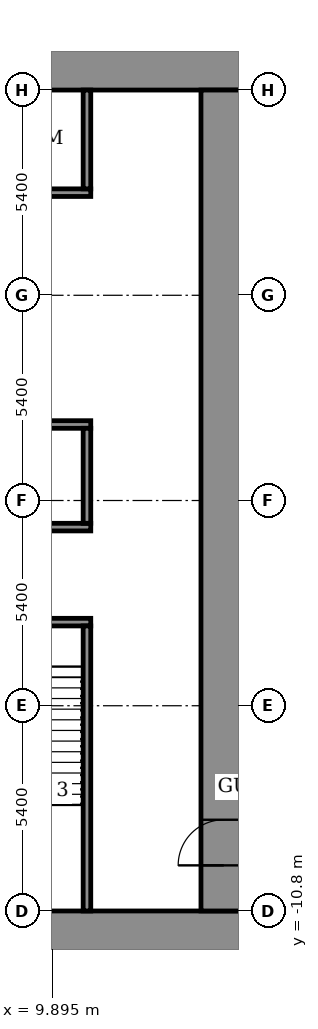
"""IFC4 building model, lengths in metres.
Left out: names, types, materials, properties, quantities, classifications, styles, units other than length and angle.
Written with IfcOpenShell. Run it as: python <this file> out.ifc"""

import sys

from ifc_helpers import new_model, si_unit, direction, frame, frame_2d, origin, place, context, subcontext, project, spatial, rectangle, extrude, element, fill, save


model = new_model("IFC4")
c1 = context("Model", 3, precision=1e-05, world=origin(), true_north=direction((0.0, 1.0)))
c2 = subcontext(c1, "Body", "Model", "MODEL_VIEW")
j1 = project(units=[si_unit("LENGTHUNIT", "METRE"), si_unit("PLANEANGLEUNIT", "RADIAN")], contexts=[c1])
p1 = place(None, origin())
s1 = spatial("IfcSite", under=j1, at=p1, CompositionType="ELEMENT")
p2 = place(p1, origin())
s2 = spatial("IfcBuilding", under=s1, at=p2, CompositionType="ELEMENT")
p3 = place(p2, frame((0.0, 0.0, 25.0)))
s3 = spatial("IfcBuildingStorey", under=s2, at=p3, CompositionType="ELEMENT", Elevation=25.0)
for number, where, z_axis, x_axis in (
    (1, (-15.0, -11.4, 0.0), (0.0, 0.0, 1.0), (1.0, 0.0, 0.0)),
    (2, (-15.0, 11.4, 0.0), (0.0, 0.0, 1.0), (1.0, 0.0, 0.0)),
):
    element("IfcWall", number, at=place(p3, frame(where, z_axis=z_axis, x_axis=x_axis)), inside=s3, PredefinedType="SHEAR", context=c2, shape_type="SweptSolid", body=[
        extrude(rectangle(XDim=30.0, YDim=1.2, at=frame_2d((15.0, 0.0))), origin(), (0.0, 0.0, 1.0), 4.5),
    ])
p4 = place(p3, frame((14.4, -10.8, 0.0), z_axis=(0.0, 0.0, 1.0), x_axis=(0.0, 1.0, 0.0)))
e3 = element("IfcWall", 3, at=p4, inside=s3, PredefinedType="SHEAR", context=c2, shape_type="SweptSolid", body=[
    extrude(rectangle(XDim=21.6, YDim=1.2, at=frame_2d((10.8, 0.0))), origin(), (0.0, 0.0, 1.0), 4.5),
])
p5 = place(p4, frame((1.2, 0.0, 0.0)))
e4 = element("IfcOpeningElement", 4, at=p5, cuts=e3, PredefinedType="OPENING", context=c2, shape_type="SweptSolid", body=[
    extrude(rectangle(XDim=1.2, YDim=2.1, at=frame_2d((0.6, 1.05))), frame((0.0, 0.61, 0.0), z_axis=(0.0, -1.0, 0.0), x_axis=(1.0, 0.0, 0.0)), (0.0, 0.0, 1.0), 1.22),
])
p6 = place(p3, frame((-10.9, -3.2, 0.0), z_axis=(0.0, 0.0, 1.0), x_axis=(1.0, 0.0, 0.0)))
e5 = element("IfcWall", 5, at=p6, inside=s3, PredefinedType="SHEAR", context=c2, shape_type="SweptSolid", body=[
    extrude(rectangle(XDim=21.8, YDim=0.2, at=frame_2d((10.9, 0.0))), origin(), (0.0, 0.0, 1.0), 3.95),
])
p7 = place(p6, frame((1.075, 0.0, 0.0)))
e6 = element("IfcOpeningElement", 6, at=p7, cuts=e5, PredefinedType="OPENING", context=c2, shape_type="SweptSolid", body=[
    extrude(rectangle(XDim=1.1, YDim=2.1, at=frame_2d((0.55, 1.05))), frame((0.0, 0.11, 0.0), z_axis=(0.0, -1.0, 0.0), x_axis=(1.0, 0.0, 0.0)), (0.0, 0.0, 1.0), 0.22),
])
p8 = place(p6, frame((10.325, 0.0, 0.0)))
e7 = element("IfcOpeningElement", 7, at=p8, cuts=e5, PredefinedType="OPENING", context=c2, shape_type="SweptSolid", body=[
    extrude(rectangle(XDim=1.1, YDim=2.1, at=frame_2d((0.55, 1.05))), frame((0.0, 0.11, 0.0), z_axis=(0.0, -1.0, 0.0), x_axis=(1.0, 0.0, 0.0)), (0.0, 0.0, 1.0), 0.22),
])
p9 = place(p6, frame((19.625, 0.0, 0.0)))
e8 = element("IfcOpeningElement", 8, at=p9, cuts=e5, PredefinedType="OPENING", context=c2, shape_type="SweptSolid", body=[
    extrude(rectangle(XDim=1.1, YDim=2.1, at=frame_2d((0.55, 1.05))), frame((0.0, 0.11, 0.0), z_axis=(0.0, -1.0, 0.0), x_axis=(1.0, 0.0, 0.0)), (0.0, 0.0, 1.0), 0.22),
])
p10 = place(p6, frame((5.7, 0.0, 0.0)))
e9 = element("IfcOpeningElement", 9, at=p10, cuts=e5, PredefinedType="OPENING", context=c2, shape_type="SweptSolid", body=[
    extrude(rectangle(XDim=1.1, YDim=2.1, at=frame_2d((0.55, 1.05))), frame((0.0, 0.11, 0.0), z_axis=(0.0, -1.0, 0.0), x_axis=(1.0, 0.0, 0.0)), (0.0, 0.0, 1.0), 0.22),
])
p11 = place(p6, frame((14.975, 0.0, 0.0)))
e10 = element("IfcOpeningElement", 10, at=p11, cuts=e5, PredefinedType="OPENING", context=c2, shape_type="SweptSolid", body=[
    extrude(rectangle(XDim=1.1, YDim=2.1, at=frame_2d((0.55, 1.05))), frame((0.0, 0.11, 0.0), z_axis=(0.0, -1.0, 0.0), x_axis=(1.0, 0.0, 0.0)), (0.0, 0.0, 1.0), 0.22),
])
p12 = place(p3, frame((-10.9, -0.7, 0.0), z_axis=(0.0, 0.0, 1.0), x_axis=(1.0, 0.0, 0.0)))
e11 = element("IfcWall", 11, at=p12, inside=s3, PredefinedType="SHEAR", context=c2, shape_type="SweptSolid", body=[
    extrude(rectangle(XDim=21.8, YDim=0.2, at=frame_2d((10.9, 0.0))), origin(), (0.0, 0.0, 1.0), 3.95),
])
p13 = place(p3, frame((-10.9, 2.0, 0.0), z_axis=(0.0, 0.0, 1.0), x_axis=(1.0, 0.0, 0.0)))
e12 = element("IfcWall", 12, at=p13, inside=s3, PredefinedType="SHEAR", context=c2, shape_type="SweptSolid", body=[
    extrude(rectangle(XDim=21.8, YDim=0.2, at=frame_2d((10.9, 0.0))), origin(), (0.0, 0.0, 1.0), 3.95),
])
p14 = place(p13, frame((0.9, 0.0, 0.0)))
e13 = element("IfcOpeningElement", 13, at=p14, cuts=e12, PredefinedType="OPENING", context=c2, shape_type="SweptSolid", body=[
    extrude(rectangle(XDim=1.1, YDim=2.1, at=frame_2d((0.55, 1.05))), frame((0.0, 0.11, 0.0), z_axis=(0.0, -1.0, 0.0), x_axis=(1.0, 0.0, 0.0)), (0.0, 0.0, 1.0), 0.22),
])
p15 = place(p13, frame((3.6, 0.0, 0.0)))
e14 = element("IfcOpeningElement", 14, at=p15, cuts=e12, PredefinedType="OPENING", context=c2, shape_type="SweptSolid", body=[
    extrude(rectangle(XDim=1.1, YDim=2.1, at=frame_2d((0.55, 1.05))), frame((0.0, 0.11, 0.0), z_axis=(0.0, -1.0, 0.0), x_axis=(1.0, 0.0, 0.0)), (0.0, 0.0, 1.0), 0.22),
])
p16 = place(p13, frame((6.3, 0.0, 0.0)))
e15 = element("IfcOpeningElement", 15, at=p16, cuts=e12, PredefinedType="OPENING", context=c2, shape_type="SweptSolid", body=[
    extrude(rectangle(XDim=1.1, YDim=2.1, at=frame_2d((0.55, 1.05))), frame((0.0, 0.11, 0.0), z_axis=(0.0, -1.0, 0.0), x_axis=(1.0, 0.0, 0.0)), (0.0, 0.0, 1.0), 0.22),
])
p17 = place(p13, frame((9.0, 0.0, 0.0)))
e16 = element("IfcOpeningElement", 16, at=p17, cuts=e12, PredefinedType="OPENING", context=c2, shape_type="SweptSolid", body=[
    extrude(rectangle(XDim=1.1, YDim=2.1, at=frame_2d((0.55, 1.05))), frame((0.0, 0.11, 0.0), z_axis=(0.0, -1.0, 0.0), x_axis=(1.0, 0.0, 0.0)), (0.0, 0.0, 1.0), 0.22),
])
p18 = place(p13, frame((11.7, 0.0, 0.0)))
e17 = element("IfcOpeningElement", 17, at=p18, cuts=e12, PredefinedType="OPENING", context=c2, shape_type="SweptSolid", body=[
    extrude(rectangle(XDim=1.1, YDim=2.1, at=frame_2d((0.55, 1.05))), frame((0.0, 0.11, 0.0), z_axis=(0.0, -1.0, 0.0), x_axis=(1.0, 0.0, 0.0)), (0.0, 0.0, 1.0), 0.22),
])
p19 = place(p13, frame((14.5, 0.0, 0.0)))
e18 = element("IfcOpeningElement", 18, at=p19, cuts=e12, PredefinedType="OPENING", context=c2, shape_type="SweptSolid", body=[
    extrude(rectangle(XDim=0.9, YDim=2.1, at=frame_2d((0.45, 1.05))), frame((0.0, 0.11, 0.0), z_axis=(0.0, -1.0, 0.0), x_axis=(1.0, 0.0, 0.0)), (0.0, 0.0, 1.0), 0.22),
])
p20 = place(p13, frame((18.55, 0.0, 0.0)))
e19 = element("IfcOpeningElement", 19, at=p20, cuts=e12, PredefinedType="OPENING", context=c2, shape_type="SweptSolid", body=[
    extrude(rectangle(XDim=0.9, YDim=2.1, at=frame_2d((0.45, 1.05))), frame((0.0, 0.11, 0.0), z_axis=(0.0, -1.0, 0.0), x_axis=(1.0, 0.0, 0.0)), (0.0, 0.0, 1.0), 0.22),
])
p21 = place(p3, frame((-10.9, 8.1, 0.0), z_axis=(0.0, 0.0, 1.0), x_axis=(1.0, 0.0, 0.0)))
e20 = element("IfcWall", 20, at=p21, inside=s3, PredefinedType="SHEAR", context=c2, shape_type="SweptSolid", body=[
    extrude(rectangle(XDim=21.8, YDim=0.2, at=frame_2d((10.9, 0.0))), origin(), (0.0, 0.0, 1.0), 3.95),
])
p22 = place(p21, frame((0.9, 0.0, 0.0)))
e21 = element("IfcOpeningElement", 21, at=p22, cuts=e20, PredefinedType="OPENING", context=c2, shape_type="SweptSolid", body=[
    extrude(rectangle(XDim=1.1, YDim=2.1, at=frame_2d((0.55, 1.05))), frame((0.0, 0.11, 0.0), z_axis=(0.0, -1.0, 0.0), x_axis=(1.0, 0.0, 0.0)), (0.0, 0.0, 1.0), 0.22),
])
p23 = place(p21, frame((3.6, 0.0, 0.0)))
e22 = element("IfcOpeningElement", 22, at=p23, cuts=e20, PredefinedType="OPENING", context=c2, shape_type="SweptSolid", body=[
    extrude(rectangle(XDim=1.1, YDim=2.1, at=frame_2d((0.55, 1.05))), frame((0.0, 0.11, 0.0), z_axis=(0.0, -1.0, 0.0), x_axis=(1.0, 0.0, 0.0)), (0.0, 0.0, 1.0), 0.22),
])
p24 = place(p21, frame((6.3, 0.0, 0.0)))
e23 = element("IfcOpeningElement", 23, at=p24, cuts=e20, PredefinedType="OPENING", context=c2, shape_type="SweptSolid", body=[
    extrude(rectangle(XDim=1.1, YDim=2.1, at=frame_2d((0.55, 1.05))), frame((0.0, 0.11, 0.0), z_axis=(0.0, -1.0, 0.0), x_axis=(1.0, 0.0, 0.0)), (0.0, 0.0, 1.0), 0.22),
])
p25 = place(p21, frame((9.0, 0.0, 0.0)))
e24 = element("IfcOpeningElement", 24, at=p25, cuts=e20, PredefinedType="OPENING", context=c2, shape_type="SweptSolid", body=[
    extrude(rectangle(XDim=1.1, YDim=2.1, at=frame_2d((0.55, 1.05))), frame((0.0, 0.11, 0.0), z_axis=(0.0, -1.0, 0.0), x_axis=(1.0, 0.0, 0.0)), (0.0, 0.0, 1.0), 0.22),
])
p26 = place(p21, frame((11.7, 0.0, 0.0)))
e25 = element("IfcOpeningElement", 25, at=p26, cuts=e20, PredefinedType="OPENING", context=c2, shape_type="SweptSolid", body=[
    extrude(rectangle(XDim=1.1, YDim=2.1, at=frame_2d((0.55, 1.05))), frame((0.0, 0.11, 0.0), z_axis=(0.0, -1.0, 0.0), x_axis=(1.0, 0.0, 0.0)), (0.0, 0.0, 1.0), 0.22),
])
p27 = place(p21, frame((14.5, 0.0, 0.0)))
e26 = element("IfcOpeningElement", 26, at=p27, cuts=e20, PredefinedType="OPENING", context=c2, shape_type="SweptSolid", body=[
    extrude(rectangle(XDim=0.9, YDim=2.1, at=frame_2d((0.45, 1.05))), frame((0.0, 0.11, 0.0), z_axis=(0.0, -1.0, 0.0), x_axis=(1.0, 0.0, 0.0)), (0.0, 0.0, 1.0), 0.22),
])
p28 = place(p21, frame((18.55, 0.0, 0.0)))
e27 = element("IfcOpeningElement", 27, at=p28, cuts=e20, PredefinedType="OPENING", context=c2, shape_type="SweptSolid", body=[
    extrude(rectangle(XDim=0.9, YDim=2.1, at=frame_2d((0.45, 1.05))), frame((0.0, 0.11, 0.0), z_axis=(0.0, -1.0, 0.0), x_axis=(1.0, 0.0, 0.0)), (0.0, 0.0, 1.0), 0.22),
])
p29 = place(p3, frame((10.8, -10.8, 0.0), z_axis=(0.0, 0.0, 1.0), x_axis=(0.0, 1.0, 0.0)))
e28 = element("IfcWall", 28, at=p29, inside=s3, PredefinedType="SHEAR", context=c2, shape_type="SweptSolid", body=[
    extrude(rectangle(XDim=7.5, YDim=0.2, at=frame_2d((3.75, 0.0))), origin(), (0.0, 0.0, 1.0), 3.95),
])
p30 = place(p3, frame((10.8, -0.6, 0.0), z_axis=(0.0, 0.0, 1.0), x_axis=(0.0, 1.0, 0.0)))
e29 = element("IfcWall", 29, at=p30, inside=s3, PredefinedType="STANDARD", context=c2, shape_type="SweptSolid", body=[
    extrude(rectangle(XDim=2.5, YDim=0.2, at=frame_2d((1.25, 0.0))), origin(), (0.0, 0.0, 1.0), 3.95),
])
p31 = place(p3, frame((10.8, 8.2, 0.0), z_axis=(0.0, 0.0, 1.0), x_axis=(0.0, 1.0, 0.0)))
e30 = element("IfcWall", 30, at=p31, inside=s3, PredefinedType="STANDARD", context=c2, shape_type="SweptSolid", body=[
    extrude(rectangle(XDim=2.6, YDim=0.2, at=frame_2d((1.3, 0.0))), origin(), (0.0, 0.0, 1.0), 3.95),
])
p32 = place(p5, origin())
e31 = element("IfcDoor", 31, at=p32, inside=s3, OperationType="DOUBLE_DOOR_SINGLE_SWING", PredefinedType="DOOR", context=c2, shape_type="SweptSolid", body=[
    extrude(rectangle(XDim=1.2, YDim=2.1, at=frame_2d((0.6, 1.05))), frame((0.0, 0.025, 0.0), z_axis=(0.0, -1.0, 0.0), x_axis=(1.0, 0.0, 0.0)), (0.0, 0.0, 1.0), 0.05),
])
fill(e4, e31)
save(model, sys.argv[1])
